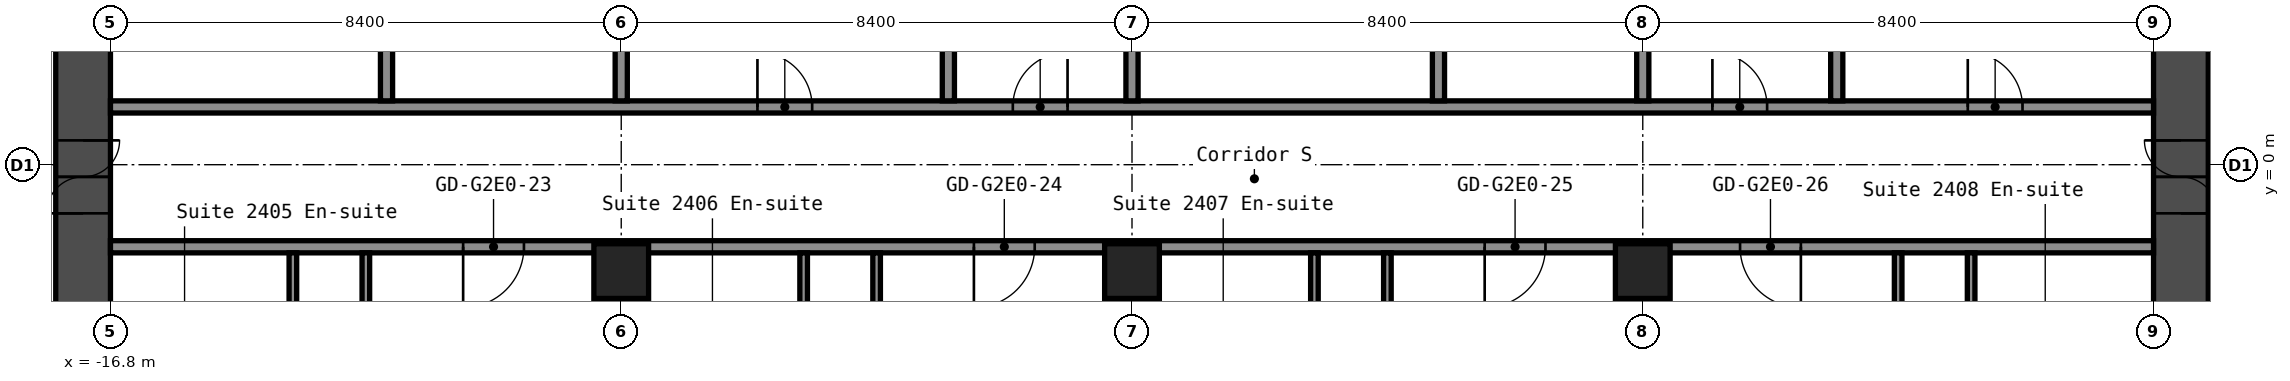
"""IFC4 building model, lengths in metres.
Left out: names, types, materials, properties, quantities, classifications, styles, units other than length and angle.
Written with IfcOpenShell. Run it as: python <this file> out.ifc"""

import sys

from ifc_helpers import new_model, si_unit, direction, frame, frame_2d, origin, origin_2d, place, context, subcontext, project, spatial, rectangle, hollow_rectangle, extrude, element, fill, save


model = new_model("IFC4")
c1 = context("Model", 3, precision=1e-05, world=origin(), true_north=direction((0.0, 1.0)))
c2 = subcontext(c1, "Body", "Model", "MODEL_VIEW")
j1 = project(units=[si_unit("LENGTHUNIT", "METRE"), si_unit("PLANEANGLEUNIT", "RADIAN")], contexts=[c1])
p1 = place(None, origin())
s1 = spatial("IfcSite", under=j1, at=p1, CompositionType="ELEMENT")
p2 = place(p1, origin())
s2 = spatial("IfcBuilding", under=s1, at=p2, CompositionType="ELEMENT")
p3 = place(p2, frame((0.0, 0.0, 88.2)))
s3 = spatial("IfcBuildingStorey", under=s2, at=p3, CompositionType="ELEMENT", Elevation=88.2)
for number, where, z_axis, x_axis in (
    (1, (-8.4, -1.75, 0.0), (0.0, 0.0, 1.0), (1.0, 0.0, 0.0)),
    (2, (0.0, -1.75, 0.0), (0.0, 0.0, 1.0), (1.0, 0.0, 0.0)),
    (3, (8.4, -1.75, 0.0), (0.0, 0.0, 1.0), (1.0, 0.0, 0.0)),
):
    element("IfcColumn", number, at=place(p3, frame(where, z_axis=z_axis, x_axis=x_axis)), inside=s3, PredefinedType="COLUMN", context=c2, shape_type="SweptSolid", body=[
        extrude(hollow_rectangle(XDim=0.9, YDim=0.9, WallThickness=0.036, at=origin_2d()), origin(), (0.0, 0.0, 1.0), 2.8),
    ])
p4 = place(p3, frame((-17.25, -8.4, 0.0), z_axis=(0.0, 0.0, 1.0), x_axis=(0.0, 1.0, 0.0)))
e4 = element("IfcWall", 4, at=p4, inside=s3, PredefinedType="SHEAR", context=c2, shape_type="SweptSolid", body=[
    extrude(rectangle(XDim=16.8, YDim=0.9, at=frame_2d((8.4, 0.0))), origin(), (0.0, 0.0, 1.0), 2.8),
])
p5 = place(p4, frame((7.6, 0.0, 0.0)))
e5 = element("IfcOpeningElement", 5, at=p5, cuts=e4, PredefinedType="OPENING", context=c2, shape_type="SweptSolid", body=[
    extrude(rectangle(XDim=1.2, YDim=2.1, at=frame_2d((0.6, 1.05))), frame((0.0, 0.46, 0.0), z_axis=(0.0, -1.0, 0.0), x_axis=(1.0, 0.0, 0.0)), (0.0, 0.0, 1.0), 0.92),
])
p6 = place(p3, frame((17.25, -8.4, 0.0), z_axis=(0.0, 0.0, 1.0), x_axis=(0.0, 1.0, 0.0)))
e6 = element("IfcWall", 6, at=p6, inside=s3, PredefinedType="SHEAR", context=c2, shape_type="SweptSolid", body=[
    extrude(rectangle(XDim=16.8, YDim=0.9, at=frame_2d((8.4, 0.0))), origin(), (0.0, 0.0, 1.0), 2.8),
])
p7 = place(p6, frame((7.6, 0.0, 0.0)))
e7 = element("IfcOpeningElement", 7, at=p7, cuts=e6, PredefinedType="OPENING", context=c2, shape_type="SweptSolid", body=[
    extrude(rectangle(XDim=1.2, YDim=2.1, at=frame_2d((0.6, 1.05))), frame((0.0, 0.46, 0.0), z_axis=(0.0, -1.0, 0.0), x_axis=(1.0, 0.0, 0.0)), (0.0, 0.0, 1.0), 0.92),
])
p8 = place(p3, frame((-16.8, -1.35, 0.0), z_axis=(0.0, 0.0, 1.0), x_axis=(1.0, 0.0, 0.0)))
e8 = element("IfcWall", 8, at=p8, inside=s3, PredefinedType="PARTITIONING", context=c2, shape_type="SweptSolid", body=[
    extrude(rectangle(XDim=33.6, YDim=0.2, at=frame_2d((16.8, 0.0))), origin(), (0.0, 0.0, 1.0), 2.8),
])
p9 = place(p8, frame((5.8, 0.0, 0.0)))
e9 = element("IfcOpeningElement", 9, at=p9, cuts=e8, PredefinedType="OPENING", context=c2, shape_type="SweptSolid", body=[
    extrude(rectangle(XDim=1.0, YDim=2.1, at=frame_2d((0.5, 1.05))), frame((0.0, 0.11, 0.0), z_axis=(0.0, -1.0, 0.0), x_axis=(1.0, 0.0, 0.0)), (0.0, 0.0, 1.0), 0.22),
])
p10 = place(p8, frame((14.2, 0.0, 0.0)))
e10 = element("IfcOpeningElement", 10, at=p10, cuts=e8, PredefinedType="OPENING", context=c2, shape_type="SweptSolid", body=[
    extrude(rectangle(XDim=1.0, YDim=2.1, at=frame_2d((0.5, 1.05))), frame((0.0, 0.11, 0.0), z_axis=(0.0, -1.0, 0.0), x_axis=(1.0, 0.0, 0.0)), (0.0, 0.0, 1.0), 0.22),
])
p11 = place(p8, frame((22.6, 0.0, 0.0)))
e11 = element("IfcOpeningElement", 11, at=p11, cuts=e8, PredefinedType="OPENING", context=c2, shape_type="SweptSolid", body=[
    extrude(rectangle(XDim=1.0, YDim=2.1, at=frame_2d((0.5, 1.05))), frame((0.0, 0.11, 0.0), z_axis=(0.0, -1.0, 0.0), x_axis=(1.0, 0.0, 0.0)), (0.0, 0.0, 1.0), 0.22),
])
p12 = place(p8, frame((26.8, 0.0, 0.0)))
e12 = element("IfcOpeningElement", 12, at=p12, cuts=e8, PredefinedType="OPENING", context=c2, shape_type="SweptSolid", body=[
    extrude(rectangle(XDim=1.0, YDim=2.1, at=frame_2d((0.5, 1.05))), frame((0.0, 0.11, 0.0), z_axis=(0.0, -1.0, 0.0), x_axis=(1.0, 0.0, 0.0)), (0.0, 0.0, 1.0), 0.22),
])
p13 = place(p3, frame((-16.8, 0.95, 0.0), z_axis=(0.0, 0.0, 1.0), x_axis=(1.0, 0.0, 0.0)))
e13 = element("IfcWall", 13, at=p13, inside=s3, PredefinedType="PARTITIONING", context=c2, shape_type="SweptSolid", body=[
    extrude(rectangle(XDim=33.6, YDim=0.2, at=frame_2d((16.8, 0.0))), origin(), (0.0, 0.0, 1.0), 2.8),
])
p14 = place(p13, frame((10.64, 0.0, 0.0)))
e14 = element("IfcOpeningElement", 14, at=p14, cuts=e13, PredefinedType="OPENING", context=c2, shape_type="SweptSolid", body=[
    extrude(rectangle(XDim=0.9, YDim=2.1, at=frame_2d((0.45, 1.05))), frame((0.0, 0.11, 0.0), z_axis=(0.0, -1.0, 0.0), x_axis=(1.0, 0.0, 0.0)), (0.0, 0.0, 1.0), 0.22),
])
p15 = place(p13, frame((14.84, 0.0, 0.0)))
e15 = element("IfcOpeningElement", 15, at=p15, cuts=e13, PredefinedType="OPENING", context=c2, shape_type="SweptSolid", body=[
    extrude(rectangle(XDim=0.9, YDim=2.1, at=frame_2d((0.45, 1.05))), frame((0.0, 0.11, 0.0), z_axis=(0.0, -1.0, 0.0), x_axis=(1.0, 0.0, 0.0)), (0.0, 0.0, 1.0), 0.22),
])
p16 = place(p13, frame((26.345, 0.0, 0.0)))
e16 = element("IfcOpeningElement", 16, at=p16, cuts=e13, PredefinedType="OPENING", context=c2, shape_type="SweptSolid", body=[
    extrude(rectangle(XDim=0.9, YDim=2.1, at=frame_2d((0.45, 1.05))), frame((0.0, 0.11, 0.0), z_axis=(0.0, -1.0, 0.0), x_axis=(1.0, 0.0, 0.0)), (0.0, 0.0, 1.0), 0.22),
])
p17 = place(p13, frame((30.545, 0.0, 0.0)))
e17 = element("IfcOpeningElement", 17, at=p17, cuts=e13, PredefinedType="OPENING", context=c2, shape_type="SweptSolid", body=[
    extrude(rectangle(XDim=0.9, YDim=2.1, at=frame_2d((0.45, 1.05))), frame((0.0, 0.11, 0.0), z_axis=(0.0, -1.0, 0.0), x_axis=(1.0, 0.0, 0.0)), (0.0, 0.0, 1.0), 0.22),
])
p18 = place(p3, frame((-13.8, -4.55, 0.0), z_axis=(0.0, 0.0, 1.0), x_axis=(0.0, 1.0, 0.0)))
e18 = element("IfcWall", 18, at=p18, inside=s3, PredefinedType="PARTITIONING", context=c2, shape_type="SweptSolid", body=[
    extrude(rectangle(XDim=3.1, YDim=0.125, at=frame_2d((1.55, 0.0))), origin(), (0.0, 0.0, 1.0), 2.8),
])
p19 = place(p3, frame((-12.6, -15.55, 0.0), z_axis=(0.0, 0.0, 1.0), x_axis=(0.0, 1.0, 0.0)))
e19 = element("IfcWall", 19, at=p19, inside=s3, PredefinedType="PARTITIONING", context=c2, shape_type="SweptSolid", body=[
    extrude(rectangle(XDim=14.1, YDim=0.125, at=frame_2d((7.05, 0.0))), origin(), (0.0, 0.0, 1.0), 2.8),
])
p20 = place(p19, frame((9.15, 0.0, 0.0)))
e20 = element("IfcOpeningElement", 20, at=p20, cuts=e19, PredefinedType="OPENING", context=c2, shape_type="SweptSolid", body=[
    extrude(rectangle(XDim=0.9, YDim=2.1, at=frame_2d((0.45, 1.05))), frame((0.0, 0.073, 0.0), z_axis=(0.0, -1.0, 0.0), x_axis=(1.0, 0.0, 0.0)), (0.0, 0.0, 1.0), 0.145),
])
p21 = place(p3, frame((-12.26, 1.05, 0.0), z_axis=(0.0, 0.0, 1.0), x_axis=(0.0, 1.0, 0.0)))
e21 = element("IfcWall", 21, at=p21, inside=s3, PredefinedType="PARTITIONING", context=c2, shape_type="SweptSolid", body=[
    extrude(rectangle(XDim=5.9, YDim=0.2, at=frame_2d((2.95, 0.0))), origin(), (0.0, 0.0, 1.0), 2.8),
])
p22 = place(p3, frame((-8.4, -15.55, 0.0), z_axis=(0.0, 0.0, 1.0), x_axis=(0.0, 1.0, 0.0)))
e22 = element("IfcWall", 22, at=p22, inside=s3, PredefinedType="PARTITIONING", context=c2, shape_type="SweptSolid", body=[
    extrude(rectangle(XDim=13.36, YDim=0.2, at=frame_2d((6.68, 0.0))), origin(), (0.0, 0.0, 1.0), 2.8),
])
p23 = place(p3, frame((-8.4, 1.05, 0.0), z_axis=(0.0, 0.0, 1.0), x_axis=(0.0, 1.0, 0.0)))
e23 = element("IfcWall", 23, at=p23, inside=s3, PredefinedType="PARTITIONING", context=c2, shape_type="SweptSolid", body=[
    extrude(rectangle(XDim=5.9, YDim=0.2, at=frame_2d((2.95, 0.0))), origin(), (0.0, 0.0, 1.0), 2.8),
])
p24 = place(p3, frame((-5.4, -4.55, 0.0), z_axis=(0.0, 0.0, 1.0), x_axis=(0.0, 1.0, 0.0)))
e24 = element("IfcWall", 24, at=p24, inside=s3, PredefinedType="PARTITIONING", context=c2, shape_type="SweptSolid", body=[
    extrude(rectangle(XDim=3.1, YDim=0.125, at=frame_2d((1.55, 0.0))), origin(), (0.0, 0.0, 1.0), 2.8),
])
p25 = place(p3, frame((-4.2, -15.55, 0.0), z_axis=(0.0, 0.0, 1.0), x_axis=(0.0, 1.0, 0.0)))
e25 = element("IfcWall", 25, at=p25, inside=s3, PredefinedType="PARTITIONING", context=c2, shape_type="SweptSolid", body=[
    extrude(rectangle(XDim=14.1, YDim=0.125, at=frame_2d((7.05, 0.0))), origin(), (0.0, 0.0, 1.0), 2.8),
])
p26 = place(p25, frame((9.15, 0.0, 0.0)))
e26 = element("IfcOpeningElement", 26, at=p26, cuts=e25, PredefinedType="OPENING", context=c2, shape_type="SweptSolid", body=[
    extrude(rectangle(XDim=0.9, YDim=2.1, at=frame_2d((0.45, 1.05))), frame((0.0, 0.073, 0.0), z_axis=(0.0, -1.0, 0.0), x_axis=(1.0, 0.0, 0.0)), (0.0, 0.0, 1.0), 0.145),
])
p27 = place(p3, frame((-3.02, 1.05, 0.0), z_axis=(0.0, 0.0, 1.0), x_axis=(0.0, 1.0, 0.0)))
e27 = element("IfcWall", 27, at=p27, inside=s3, PredefinedType="PARTITIONING", context=c2, shape_type="SweptSolid", body=[
    extrude(rectangle(XDim=5.9, YDim=0.2, at=frame_2d((2.95, 0.0))), origin(), (0.0, 0.0, 1.0), 2.8),
])
p28 = place(p3, frame((0.0, -15.55, 0.0), z_axis=(0.0, 0.0, 1.0), x_axis=(0.0, 1.0, 0.0)))
e28 = element("IfcWall", 28, at=p28, inside=s3, PredefinedType="PARTITIONING", context=c2, shape_type="SweptSolid", body=[
    extrude(rectangle(XDim=13.36, YDim=0.2, at=frame_2d((6.68, 0.0))), origin(), (0.0, 0.0, 1.0), 2.8),
])
p29 = place(p3, frame((0.0, 1.05, 0.0), z_axis=(0.0, 0.0, 1.0), x_axis=(0.0, 1.0, 0.0)))
e29 = element("IfcWall", 29, at=p29, inside=s3, PredefinedType="PARTITIONING", context=c2, shape_type="SweptSolid", body=[
    extrude(rectangle(XDim=5.9, YDim=0.2, at=frame_2d((2.95, 0.0))), origin(), (0.0, 0.0, 1.0), 2.8),
])
p30 = place(p3, frame((3.0, -4.55, 0.0), z_axis=(0.0, 0.0, 1.0), x_axis=(0.0, 1.0, 0.0)))
e30 = element("IfcWall", 30, at=p30, inside=s3, PredefinedType="PARTITIONING", context=c2, shape_type="SweptSolid", body=[
    extrude(rectangle(XDim=3.1, YDim=0.125, at=frame_2d((1.55, 0.0))), origin(), (0.0, 0.0, 1.0), 2.8),
])
p31 = place(p3, frame((4.2, -15.55, 0.0), z_axis=(0.0, 0.0, 1.0), x_axis=(0.0, 1.0, 0.0)))
e31 = element("IfcWall", 31, at=p31, inside=s3, PredefinedType="PARTITIONING", context=c2, shape_type="SweptSolid", body=[
    extrude(rectangle(XDim=14.1, YDim=0.125, at=frame_2d((7.05, 0.0))), origin(), (0.0, 0.0, 1.0), 2.8),
])
p32 = place(p31, frame((9.15, 0.0, 0.0)))
e32 = element("IfcOpeningElement", 32, at=p32, cuts=e31, PredefinedType="OPENING", context=c2, shape_type="SweptSolid", body=[
    extrude(rectangle(XDim=0.9, YDim=2.1, at=frame_2d((0.45, 1.05))), frame((0.0, 0.073, 0.0), z_axis=(0.0, -1.0, 0.0), x_axis=(1.0, 0.0, 0.0)), (0.0, 0.0, 1.0), 0.145),
])
p33 = place(p3, frame((5.04, 1.05, 0.0), z_axis=(0.0, 0.0, 1.0), x_axis=(0.0, 1.0, 0.0)))
e33 = element("IfcWall", 33, at=p33, inside=s3, PredefinedType="PARTITIONING", context=c2, shape_type="SweptSolid", body=[
    extrude(rectangle(XDim=5.9, YDim=0.2, at=frame_2d((2.95, 0.0))), origin(), (0.0, 0.0, 1.0), 2.8),
])
p34 = place(p3, frame((8.4, -15.55, 0.0), z_axis=(0.0, 0.0, 1.0), x_axis=(0.0, 1.0, 0.0)))
e34 = element("IfcWall", 34, at=p34, inside=s3, PredefinedType="PARTITIONING", context=c2, shape_type="SweptSolid", body=[
    extrude(rectangle(XDim=13.36, YDim=0.2, at=frame_2d((6.68, 0.0))), origin(), (0.0, 0.0, 1.0), 2.8),
])
for number, where, z_axis, x_axis in (
    (35, (8.4, 1.05, 0.0), (0.0, 0.0, 1.0), (0.0, 1.0, 0.0)),
    (36, (11.59, 1.05, 0.0), (0.0, 0.0, 1.0), (0.0, 1.0, 0.0)),
):
    element("IfcWall", number, at=place(p3, frame(where, z_axis=z_axis, x_axis=x_axis)), inside=s3, PredefinedType="PARTITIONING", context=c2, shape_type="SweptSolid", body=[
        extrude(rectangle(XDim=5.9, YDim=0.2, at=frame_2d((2.95, 0.0))), origin(), (0.0, 0.0, 1.0), 2.8),
    ])
p35 = place(p3, frame((12.6, -15.55, 0.0), z_axis=(0.0, 0.0, 1.0), x_axis=(0.0, 1.0, 0.0)))
e37 = element("IfcWall", 37, at=p35, inside=s3, PredefinedType="PARTITIONING", context=c2, shape_type="SweptSolid", body=[
    extrude(rectangle(XDim=14.1, YDim=0.125, at=frame_2d((7.05, 0.0))), origin(), (0.0, 0.0, 1.0), 2.8),
])
p36 = place(p35, frame((9.15, 0.0, 0.0)))
e38 = element("IfcOpeningElement", 38, at=p36, cuts=e37, PredefinedType="OPENING", context=c2, shape_type="SweptSolid", body=[
    extrude(rectangle(XDim=0.9, YDim=2.1, at=frame_2d((0.45, 1.05))), frame((0.0, 0.073, 0.0), z_axis=(0.0, -1.0, 0.0), x_axis=(1.0, 0.0, 0.0)), (0.0, 0.0, 1.0), 0.145),
])
p37 = place(p3, frame((13.8, -4.55, 0.0), z_axis=(0.0, 0.0, 1.0), x_axis=(0.0, 1.0, 0.0)))
e39 = element("IfcWall", 39, at=p37, inside=s3, PredefinedType="PARTITIONING", context=c2, shape_type="SweptSolid", body=[
    extrude(rectangle(XDim=3.1, YDim=0.125, at=frame_2d((1.55, 0.0))), origin(), (0.0, 0.0, 1.0), 2.8),
])
p38 = place(p5, origin())
e40 = element("IfcDoor", 40, at=p38, inside=s3, OperationType="DOUBLE_DOOR_SINGLE_SWING", PredefinedType="DOOR", context=c2, shape_type="SweptSolid", body=[
    extrude(rectangle(XDim=1.2, YDim=2.1, at=frame_2d((0.6, 1.05))), frame((0.0, 0.025, 0.0), z_axis=(0.0, -1.0, 0.0), x_axis=(1.0, 0.0, 0.0)), (0.0, 0.0, 1.0), 0.05),
])
fill(e5, e40)
p39 = place(p7, origin())
e41 = element("IfcDoor", 41, at=p39, inside=s3, OperationType="DOUBLE_DOOR_SINGLE_SWING", PredefinedType="DOOR", context=c2, shape_type="SweptSolid", body=[
    extrude(rectangle(XDim=1.2, YDim=2.1, at=frame_2d((0.6, 1.05))), frame((0.0, 0.025, 0.0), z_axis=(0.0, -1.0, 0.0), x_axis=(1.0, 0.0, 0.0)), (0.0, 0.0, 1.0), 0.05),
])
fill(e7, e41)
p40 = place(p9, origin())
e42 = element("IfcDoor", 42, at=p40, inside=s3, OperationType="SINGLE_SWING_LEFT", PredefinedType="DOOR", context=c2, shape_type="SweptSolid", body=[
    extrude(rectangle(XDim=1.0, YDim=2.1, at=frame_2d((0.5, 1.05))), frame((0.0, 0.025, 0.0), z_axis=(0.0, -1.0, 0.0), x_axis=(1.0, 0.0, 0.0)), (0.0, 0.0, 1.0), 0.05),
])
fill(e9, e42)
p41 = place(p10, origin())
e43 = element("IfcDoor", 43, at=p41, inside=s3, OperationType="SINGLE_SWING_LEFT", PredefinedType="DOOR", context=c2, shape_type="SweptSolid", body=[
    extrude(rectangle(XDim=1.0, YDim=2.1, at=frame_2d((0.5, 1.05))), frame((0.0, 0.025, 0.0), z_axis=(0.0, -1.0, 0.0), x_axis=(1.0, 0.0, 0.0)), (0.0, 0.0, 1.0), 0.05),
])
fill(e10, e43)
p42 = place(p11, origin())
e44 = element("IfcDoor", 44, at=p42, inside=s3, OperationType="SINGLE_SWING_LEFT", PredefinedType="DOOR", context=c2, shape_type="SweptSolid", body=[
    extrude(rectangle(XDim=1.0, YDim=2.1, at=frame_2d((0.5, 1.05))), frame((0.0, 0.025, 0.0), z_axis=(0.0, -1.0, 0.0), x_axis=(1.0, 0.0, 0.0)), (0.0, 0.0, 1.0), 0.05),
])
fill(e11, e44)
p43 = place(p12, origin())
e45 = element("IfcDoor", 45, at=p43, inside=s3, OperationType="SINGLE_SWING_RIGHT", PredefinedType="DOOR", context=c2, shape_type="SweptSolid", body=[
    extrude(rectangle(XDim=1.0, YDim=2.1, at=frame_2d((0.5, 1.05))), frame((0.0, 0.025, 0.0), z_axis=(0.0, -1.0, 0.0), x_axis=(1.0, 0.0, 0.0)), (0.0, 0.0, 1.0), 0.05),
])
fill(e12, e45)
p44 = place(p14, origin())
e46 = element("IfcDoor", 46, at=p44, inside=s3, OperationType="SINGLE_SWING_RIGHT", PredefinedType="DOOR", context=c2, shape_type="SweptSolid", body=[
    extrude(rectangle(XDim=0.9, YDim=2.1, at=frame_2d((0.45, 1.05))), frame((0.0, 0.025, 0.0), z_axis=(0.0, -1.0, 0.0), x_axis=(1.0, 0.0, 0.0)), (0.0, 0.0, 1.0), 0.05),
])
fill(e14, e46)
p45 = place(p15, origin())
e47 = element("IfcDoor", 47, at=p45, inside=s3, OperationType="SINGLE_SWING_LEFT", PredefinedType="DOOR", context=c2, shape_type="SweptSolid", body=[
    extrude(rectangle(XDim=0.9, YDim=2.1, at=frame_2d((0.45, 1.05))), frame((0.0, 0.025, 0.0), z_axis=(0.0, -1.0, 0.0), x_axis=(1.0, 0.0, 0.0)), (0.0, 0.0, 1.0), 0.05),
])
fill(e15, e47)
p46 = place(p16, origin())
e48 = element("IfcDoor", 48, at=p46, inside=s3, OperationType="SINGLE_SWING_RIGHT", PredefinedType="DOOR", context=c2, shape_type="SweptSolid", body=[
    extrude(rectangle(XDim=0.9, YDim=2.1, at=frame_2d((0.45, 1.05))), frame((0.0, 0.025, 0.0), z_axis=(0.0, -1.0, 0.0), x_axis=(1.0, 0.0, 0.0)), (0.0, 0.0, 1.0), 0.05),
])
fill(e16, e48)
p47 = place(p17, origin())
e49 = element("IfcDoor", 49, at=p47, inside=s3, OperationType="SINGLE_SWING_RIGHT", PredefinedType="DOOR", context=c2, shape_type="SweptSolid", body=[
    extrude(rectangle(XDim=0.9, YDim=2.1, at=frame_2d((0.45, 1.05))), frame((0.0, 0.025, 0.0), z_axis=(0.0, -1.0, 0.0), x_axis=(1.0, 0.0, 0.0)), (0.0, 0.0, 1.0), 0.05),
])
fill(e17, e49)
save(model, sys.argv[1])
